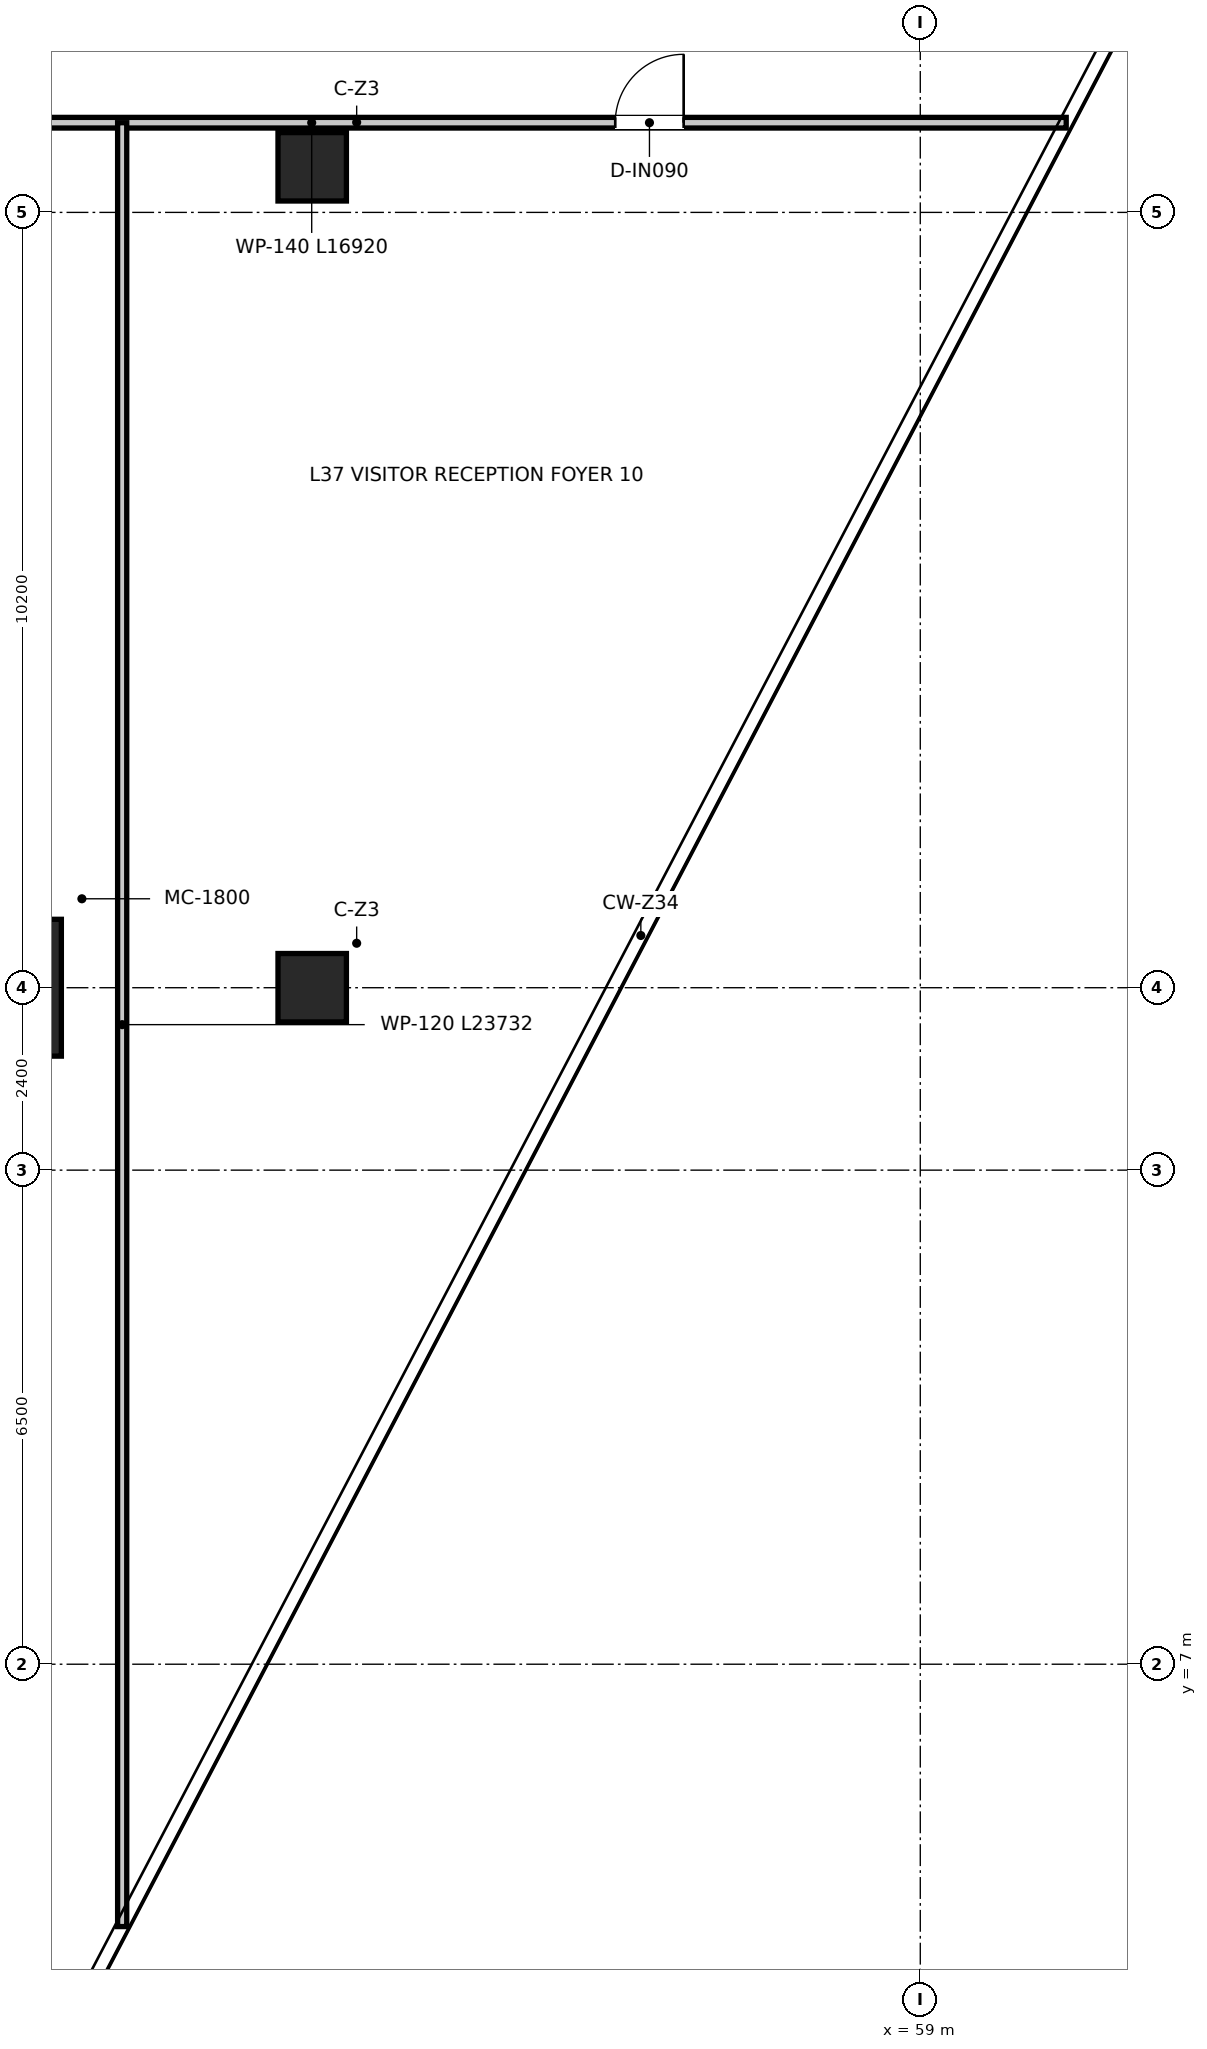
"""IFC4 building model, lengths in metres.
Left out: names, types, materials, properties, quantities, classifications, styles, units other than length and angle.
Written with IfcOpenShell. Run it as: python <this file> out.ifc"""

import sys

from ifc_helpers import new_model, si_unit, direction, frame, frame_2d, origin, origin_2d, place, context, subcontext, project, spatial, rectangle, extrude, source, transform, mapped, element, fill, save


model = new_model("IFC4")
c1 = context("Model", 3, precision=1e-05, world=origin(), true_north=direction((0.0, 1.0)))
c2 = subcontext(c1, "Body", "Model", "MODEL_VIEW")
j1 = project(units=[si_unit("LENGTHUNIT", "METRE"), si_unit("PLANEANGLEUNIT", "RADIAN")], contexts=[c1])
p1 = place(None, origin())
s1 = spatial("IfcSite", under=j1, at=p1, CompositionType="ELEMENT")
p2 = place(p1, origin())
s2 = spatial("IfcBuilding", under=s1, at=p2, CompositionType="ELEMENT")
p3 = place(p2, frame((0.0, 0.0, 154.1)))
s3 = spatial("IfcBuildingStorey", under=s2, at=p3, CompositionType="ELEMENT", Elevation=154.1)
m1 = source(origin(), c2, "Body", "SweptSolid", [
    extrude(rectangle(XDim=1.8, YDim=1.8, at=origin_2d()), origin(), (0.0, 0.0, 1.0), 3.95),
])
p4 = place(p3, frame((46.8, 15.9, 0.0), z_axis=(0.0, 0.0, 1.0), x_axis=(1.0, 0.0, 0.0)))
e1 = element("IfcColumn", 1, at=p4, inside=s3, PredefinedType="USERDEFINED", context=c2, shape_type="MappedRepresentation", body=[
    mapped(m1, transform((0.0, 0.0, 0.0), x_axis=(1.0, 0.0, 0.0), y_axis=(0.0, 1.0, 0.0), z_axis=(0.0, 0.0, 1.0), scale=1.0)),
])
m2 = source(origin(), c2, "Body", "SweptSolid", [
    extrude(rectangle(XDim=0.9, YDim=0.9, at=origin_2d()), origin(), (0.0, 0.0, 1.0), 3.95),
])
for number, where, z_axis, x_axis in (
    (2, (51.0, 26.7, 0.0), (0.0, 0.0, 1.0), (1.0, 0.0, 0.0)),
    (3, (51.0, 15.9, 0.0), (0.0, 0.0, 1.0), (1.0, 0.0, 0.0)),
):
    element("IfcColumn", number, at=place(p3, frame(where, z_axis=z_axis, x_axis=x_axis)), inside=s3, PredefinedType="COLUMN", context=c2, shape_type="MappedRepresentation", body=[
        mapped(m2, transform((0.0, 0.0, 0.0), x_axis=(1.0, 0.0, 0.0), y_axis=(0.0, 1.0, 0.0), z_axis=(0.0, 0.0, 1.0), scale=1.0)),
    ])
p5 = place(p3, frame((44.0, 27.28, 0.0), z_axis=(0.0, 0.0, 1.0), x_axis=(1.0, 0.0, 0.0)))
e4 = element("IfcWall", 4, at=p5, inside=s3, PredefinedType="PARTITIONING", context=c2, shape_type="SweptSolid", body=[
    extrude(rectangle(XDim=16.92, YDim=0.14, at=frame_2d((8.46, 0.0))), origin(), (0.0, 0.0, 1.0), 3.03),
])
p6 = place(p5, frame((2.1, 0.0, 0.0)))
e5 = element("IfcOpeningElement", 5, at=p6, cuts=e4, PredefinedType="OPENING", context=c2, shape_type="SweptSolid", body=[
    extrude(rectangle(XDim=0.9, YDim=2.1, at=frame_2d((0.45, 1.05))), frame((0.0, 0.08, 0.0), z_axis=(0.0, -1.0, 0.0), x_axis=(1.0, 0.0, 0.0)), (0.0, 0.0, 1.0), 0.16),
])
p7 = place(p5, frame((10.987, 0.0, 0.0)))
e6 = element("IfcOpeningElement", 6, at=p7, cuts=e4, PredefinedType="OPENING", context=c2, shape_type="SweptSolid", body=[
    extrude(rectangle(XDim=0.9, YDim=2.1, at=frame_2d((0.45, 1.05))), frame((0.0, 0.08, 0.0), z_axis=(0.0, -1.0, 0.0), x_axis=(1.0, 0.0, 0.0)), (0.0, 0.0, 1.0), 0.16),
])
p8 = place(p3, frame((48.5, 3.548, 0.0), z_axis=(0.0, 0.0, 1.0), x_axis=(0.0, 1.0, 0.0)))
e7 = element("IfcWall", 7, at=p8, inside=s3, PredefinedType="PARTITIONING", context=c2, shape_type="SweptSolid", body=[
    extrude(rectangle(XDim=23.732, YDim=0.12, at=frame_2d((11.866, 0.0))), origin(), (0.0, 0.0, 1.0), 3.08),
])
p9 = place(p7, origin())
e8 = element("IfcDoor", 8, at=p9, inside=s3, OperationType="SINGLE_SWING_RIGHT", PredefinedType="DOOR", context=c2, shape_type="SweptSolid", body=[
    extrude(rectangle(XDim=0.9, YDim=2.1, at=frame_2d((0.45, 1.05))), frame((0.0, 0.025, 0.0), z_axis=(0.0, -1.0, 0.0), x_axis=(1.0, 0.0, 0.0)), (0.0, 0.0, 1.0), 0.05),
])
fill(e6, e8)
save(model, sys.argv[1])
